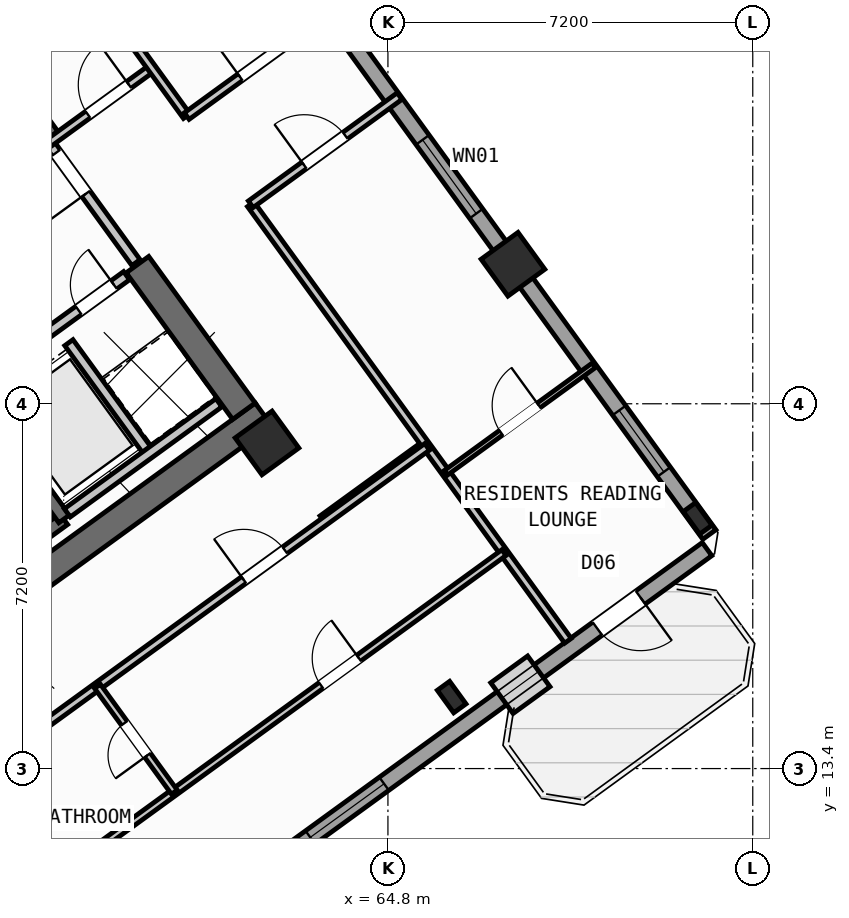
"""IFC4 building model, lengths in metres.
Left out: names, types, materials, properties, quantities, classifications, styles, units other than length and angle.
Written with IfcOpenShell. Run it as: python <this file> out.ifc"""

import sys

from ifc_helpers import new_model, si_unit, direction, frame, frame_2d, origin, origin_2d, place, context, subcontext, project, spatial, rectangle, hollow_rectangle, i_section, extrude, source, transform, mapped, element, fill, save


model = new_model("IFC4")
c1 = context("Model", 3, precision=1e-05, world=origin(), true_north=direction((0.0, 1.0)))
c2 = subcontext(c1, "Body", "Model", "MODEL_VIEW")
j1 = project(units=[si_unit("LENGTHUNIT", "METRE"), si_unit("PLANEANGLEUNIT", "RADIAN")], contexts=[c1])
p1 = place(None, origin())
s1 = spatial("IfcSite", under=j1, at=p1, CompositionType="ELEMENT")
p2 = place(p1, origin())
s2 = spatial("IfcBuilding", under=s1, at=p2, CompositionType="ELEMENT")
p3 = place(p2, frame((0.0, 0.0, 147.9)))
s3 = spatial("IfcBuildingStorey", under=s2, at=p3, CompositionType="ELEMENT", Elevation=147.9)
p4 = place(p3, frame((52.359, 13.14, 0.0), z_axis=(0.0, 0.0, 1.0), x_axis=(0.809014896919, 0.587788139183, 0.0)))
e1 = element("IfcWall", 1, at=p4, inside=s3, PredefinedType="SHEAR", context=c2, shape_type="SweptSolid", body=[
    extrude(rectangle(XDim=12.34, YDim=0.55, at=frame_2d((6.17, 0.0))), origin(), (0.0, 0.0, 1.0), 3.35),
])
p5 = place(p3, frame((61.958, 20.454, 0.0), z_axis=(0.0, 0.0, 1.0), x_axis=(-0.587802113096, 0.809004744015, 0.0)))
e2 = element("IfcWall", 2, at=p5, inside=s3, PredefinedType="SHEAR", context=c2, shape_type="SweptSolid", body=[
    extrude(rectangle(XDim=3.575, YDim=0.55, at=frame_2d((1.788, 0.0))), origin(), (0.0, 0.0, 1.0), 3.35),
])
p6 = place(p3, frame((58.064, 25.813, 0.0), z_axis=(0.0, 0.0, 1.0), x_axis=(-0.587764933797, 0.809031756236, 0.0)))
e3 = element("IfcWall", 3, at=p6, inside=s3, PredefinedType="SHEAR", context=c2, shape_type="SweptSolid", body=[
    extrude(rectangle(XDim=6.425, YDim=0.55, at=frame_2d((3.212, 0.0))), origin(), (0.0, 0.0, 1.0), 3.35),
])
m1 = source(origin(), c2, "Body", "SweptSolid", [
    extrude(i_section(OverallWidth=0.3, OverallDepth=0.55, WebThickness=0.015, FlangeThickness=0.029, at=origin_2d()), origin(), (0.0, 0.0, 1.0), 3.6),
])
p7 = place(p3, frame((66.058, 14.811, 0.0), z_axis=(0.0, 0.0, 1.0), x_axis=(0.809016994375, 0.587785252292, 0.0)))
e4 = element("IfcColumn", 4, at=p7, inside=s3, PredefinedType="COLUMN", context=c2, shape_type="MappedRepresentation", body=[
    mapped(m1, transform((0.0, 0.0, 0.0), scale=1.0)),
])
m2 = source(origin(), c2, "Body", "SweptSolid", [
    extrude(hollow_rectangle(XDim=0.9, YDim=0.9, WallThickness=0.036, at=origin_2d()), origin(), (0.0, 0.0, 1.0), 3.6),
])
p8 = place(p3, frame((62.414, 19.827, 0.0), z_axis=(0.0, 0.0, 1.0), x_axis=(0.809016994375, 0.587785252292, 0.0)))
e5 = element("IfcColumn", 5, at=p8, inside=s3, PredefinedType="COLUMN", context=c2, shape_type="MappedRepresentation", body=[
    mapped(m2, transform((0.0, 0.0, 0.0), scale=1.0)),
])
p9 = place(p3, frame((70.912, 18.338, 0.0), z_axis=(0.0, 0.0, 1.0), x_axis=(0.809016994375, 0.587785252292, 0.0)))
e6 = element("IfcColumn", 6, at=p9, inside=s3, PredefinedType="COLUMN", context=c2, shape_type="MappedRepresentation", body=[
    mapped(m1, transform((0.0, 0.0, 0.0), scale=1.0)),
])
p10 = place(p3, frame((67.268, 23.354, 0.0), z_axis=(0.0, 0.0, 1.0), x_axis=(0.809016994375, 0.587785252292, 0.0)))
e7 = element("IfcColumn", 7, at=p10, inside=s3, PredefinedType="COLUMN", context=c2, shape_type="MappedRepresentation", body=[
    mapped(m2, transform((0.0, 0.0, 0.0), scale=1.0)),
])
p11 = place(p3, frame((43.938, 25.192, 0.0), z_axis=(0.0, 0.0, 1.0), x_axis=(0.809016324578, 0.587786174187, 0.0)))
e8 = element("IfcWall", 8, at=p11, inside=s3, PredefinedType="STANDARD", context=c2, shape_type="SweptSolid", body=[
    extrude(rectangle(XDim=17.587, YDim=0.32, at=frame_2d((8.794, 0.0))), origin(), (0.0, 0.0, 1.0), 3.35),
])
p12 = place(p11, frame((14.914, 0.0, 0.0)))
e9 = element("IfcOpeningElement", 9, at=p12, cuts=e8, PredefinedType="OPENING", context=c2, shape_type="SweptSolid", body=[
    extrude(rectangle(XDim=1.05, YDim=2.15, at=frame_2d((0.525, 1.075))), frame((0.0, 0.17, 0.0), z_axis=(0.0, -1.0, 0.0), x_axis=(1.0, 0.0, 0.0)), (0.0, 0.0, 1.0), 0.34),
])
p13 = place(p11, frame((2.144, 0.0, 0.8)))
e10 = element("IfcOpeningElement", 10, at=p13, cuts=e8, PredefinedType="OPENING", context=c2, shape_type="SweptSolid", body=[
    extrude(rectangle(XDim=2.1, YDim=1.55, at=frame_2d((1.05, 0.775))), frame((0.0, 0.17, 0.0), z_axis=(0.0, -1.0, 0.0), x_axis=(1.0, 0.0, 0.0)), (0.0, 0.0, 1.0), 0.34),
])
p14 = place(p11, frame((7.344, 0.0, 0.8)))
e11 = element("IfcOpeningElement", 11, at=p14, cuts=e8, PredefinedType="OPENING", context=c2, shape_type="SweptSolid", body=[
    extrude(rectangle(XDim=2.1, YDim=1.55, at=frame_2d((1.05, 0.775))), frame((0.0, 0.17, 0.0), z_axis=(0.0, -1.0, 0.0), x_axis=(1.0, 0.0, 0.0)), (0.0, 0.0, 1.0), 0.34),
])
p15 = place(p3, frame((58.455, 35.484, 0.0), z_axis=(0.0, 0.0, 1.0), x_axis=(0.587783625747, -0.809018176127, 0.0)))
e12 = element("IfcWall", 12, at=p15, inside=s3, PredefinedType="STANDARD", context=c2, shape_type="SweptSolid", body=[
    extrude(rectangle(XDim=21.587, YDim=0.32, at=frame_2d((10.794, 0.0))), origin(), (0.0, 0.0, 1.0), 2.775),
])
p16 = place(p15, frame((2.994, 0.0, 0.8)))
e13 = element("IfcOpeningElement", 13, at=p16, cuts=e12, PredefinedType="OPENING", context=c2, shape_type="SweptSolid", body=[
    extrude(rectangle(XDim=2.1, YDim=1.55, at=frame_2d((1.05, 0.775))), frame((0.0, 0.17, 0.0), z_axis=(0.0, -1.0, 0.0), x_axis=(1.0, 0.0, 0.0)), (0.0, 0.0, 1.0), 0.34),
])
p17 = place(p15, frame((11.959, 0.0, 0.85)))
e14 = element("IfcOpeningElement", 14, at=p17, cuts=e12, PredefinedType="OPENING", context=c2, shape_type="SweptSolid", body=[
    extrude(rectangle(XDim=1.8, YDim=1.5, at=frame_2d((0.9, 0.75))), frame((0.0, 0.17, 0.0), z_axis=(0.0, -1.0, 0.0), x_axis=(1.0, 0.0, 0.0)), (0.0, 0.0, 1.0), 0.34),
])
p18 = place(p15, frame((18.56, 0.0, 0.85)))
e15 = element("IfcOpeningElement", 15, at=p18, cuts=e12, PredefinedType="OPENING", context=c2, shape_type="SweptSolid", body=[
    extrude(rectangle(XDim=1.5, YDim=1.5, at=frame_2d((0.75, 0.75))), frame((0.0, 0.17, 0.0), z_axis=(0.0, -1.0, 0.0), x_axis=(1.0, 0.0, 0.0)), (0.0, 0.0, 1.0), 0.34),
])
p19 = place(p3, frame((71.098, 17.731, 0.0), z_axis=(0.0, 0.0, 1.0), x_axis=(-0.809021120468, -0.587779573171, 0.0)))
e16 = element("IfcWall", 16, at=p19, inside=s3, PredefinedType="STANDARD", context=c2, shape_type="SweptSolid", body=[
    extrude(rectangle(XDim=17.588, YDim=0.32, at=frame_2d((8.794, 0.0))), origin(), (0.0, 0.0, 1.0), 3.35),
])
p20 = place(p19, frame((1.624, 0.0, 0.0)))
e17 = element("IfcOpeningElement", 17, at=p20, cuts=e16, PredefinedType="OPENING", context=c2, shape_type="SweptSolid", body=[
    extrude(rectangle(XDim=1.05, YDim=2.15, at=frame_2d((0.525, 1.075))), frame((0.0, 0.17, 0.0), z_axis=(0.0, -1.0, 0.0), x_axis=(1.0, 0.0, 0.0)), (0.0, 0.0, 1.0), 0.34),
])
p21 = place(p19, frame((4.104, 0.0, 1.0)))
e18 = element("IfcOpeningElement", 18, at=p21, cuts=e16, PredefinedType="OPENING", context=c2, shape_type="SweptSolid", body=[
    extrude(rectangle(XDim=0.9, YDim=1.25, at=frame_2d((0.45, 0.625))), frame((0.0, 0.17, 0.0), z_axis=(0.0, -1.0, 0.0), x_axis=(1.0, 0.0, 0.0)), (0.0, 0.0, 1.0), 0.34),
])
p22 = place(p19, frame((7.879, 0.0, 0.85)))
e19 = element("IfcOpeningElement", 19, at=p22, cuts=e16, PredefinedType="OPENING", context=c2, shape_type="SweptSolid", body=[
    extrude(rectangle(XDim=1.8, YDim=1.5, at=frame_2d((0.9, 0.75))), frame((0.0, 0.17, 0.0), z_axis=(0.0, -1.0, 0.0), x_axis=(1.0, 0.0, 0.0)), (0.0, 0.0, 1.0), 0.34),
])
p23 = place(p19, frame((12.849, 0.0, 0.85)))
e20 = element("IfcOpeningElement", 20, at=p23, cuts=e16, PredefinedType="OPENING", context=c2, shape_type="SweptSolid", body=[
    extrude(rectangle(XDim=1.8, YDim=1.5, at=frame_2d((0.9, 0.75))), frame((0.0, 0.17, 0.0), z_axis=(0.0, -1.0, 0.0), x_axis=(1.0, 0.0, 0.0)), (0.0, 0.0, 1.0), 0.34),
])
p24 = place(p3, frame((52.472, 14.013, 0.0), z_axis=(0.0, 0.0, 1.0), x_axis=(0.809028366311, 0.587769599847, 0.0)))
e21 = element("IfcWall", 21, at=p24, inside=s3, PredefinedType="SHEAR", context=c2, shape_type="SweptSolid", body=[
    extrude(rectangle(XDim=7.33, YDim=0.26, at=frame_2d((3.665, 0.0))), origin(), (0.0, 0.0, 1.0), 3.35),
])
p25 = place(p3, frame((58.41, 18.327, 0.0), z_axis=(0.0, 0.0, 1.0), x_axis=(-0.58776738483, 0.809029975545, 0.0)))
e22 = element("IfcWall", 22, at=p25, inside=s3, PredefinedType="SHEAR", context=c2, shape_type="SweptSolid", body=[
    extrude(rectangle(XDim=3.16, YDim=0.26, at=frame_2d((1.58, 0.0))), origin(), (0.0, 0.0, 1.0), 3.35),
])
p26 = place(p3, frame((56.553, 20.884, 0.0), z_axis=(0.0, 0.0, 1.0), x_axis=(0.809023564264, 0.58777620951, 0.0)))
e23 = element("IfcWall", 23, at=p26, inside=s3, PredefinedType="STANDARD", context=c2, shape_type="SweptSolid", body=[
    extrude(rectangle(XDim=3.818, YDim=0.2, at=frame_2d((1.909, 0.0))), origin(), (0.0, 0.0, 1.0), 3.34),
])
p27 = place(p26, frame((0.57, 0.0, 0.0)))
e24 = element("IfcOpeningElement", 24, at=p27, cuts=e23, PredefinedType="OPENING", context=c2, shape_type="SweptSolid", body=[
    extrude(rectangle(XDim=1.1, YDim=2.15, at=frame_2d((0.55, 1.075))), frame((0.0, 0.11, 0.0), z_axis=(0.0, -1.0, 0.0), x_axis=(1.0, 0.0, 0.0)), (0.0, 0.0, 1.0), 0.22),
])
p28 = place(p26, frame((2.65, 0.0, 0.0)))
e25 = element("IfcOpeningElement", 25, at=p28, cuts=e23, PredefinedType="OPENING", context=c2, shape_type="SweptSolid", body=[
    extrude(rectangle(XDim=0.86, YDim=2.05, at=frame_2d((0.43, 1.025))), frame((0.0, 0.11, 0.0), z_axis=(0.0, -1.0, 0.0), x_axis=(1.0, 0.0, 0.0)), (0.0, 0.0, 1.0), 0.22),
])
p29 = place(p3, frame((60.067, 19.655, 0.0), z_axis=(0.0, 0.0, 1.0), x_axis=(-0.587800520745, 0.809005900975, 0.0)))
e26 = element("IfcWall", 26, at=p29, inside=s3, PredefinedType="STANDARD", context=c2, shape_type="SweptSolid", body=[
    extrude(rectangle(XDim=2.66, YDim=0.2, at=frame_2d((1.33, 0.0))), origin(), (0.0, 0.0, 1.0), 3.34),
])
p30 = place(p3, frame((58.472, 18.447, 0.0), z_axis=(0.0, 0.0, 1.0), x_axis=(0.809018631237, 0.587782999339, 0.0)))
e27 = element("IfcWall", 27, at=p30, inside=s3, PredefinedType="STANDARD", context=c2, shape_type="SweptSolid", body=[
    extrude(rectangle(XDim=3.698, YDim=0.2, at=frame_2d((1.849, 0.0))), origin(), (0.0, 0.0, 1.0), 3.34),
])
p31 = place(p3, frame((59.827, 23.386, 0.0), z_axis=(0.0, 0.0, 1.0), x_axis=(-0.587803840107, 0.809003489211, 0.0)))
e28 = element("IfcWall", 28, at=p31, inside=s3, PredefinedType="STANDARD", context=c2, shape_type="SweptSolid", body=[
    extrude(rectangle(XDim=2.96, YDim=0.2, at=frame_2d((1.48, 0.0))), origin(), (0.0, 0.0, 1.0), 3.34),
])
p32 = place(p31, frame((1.68, 0.0, 0.0)))
e29 = element("IfcOpeningElement", 29, at=p32, cuts=e28, PredefinedType="OPENING", context=c2, shape_type="SweptSolid", body=[
    extrude(rectangle(XDim=1.0, YDim=2.1, at=frame_2d((0.5, 1.05))), frame((0.0, 0.11, 0.0), z_axis=(0.0, -1.0, 0.0), x_axis=(1.0, 0.0, 0.0)), (0.0, 0.0, 1.0), 0.22),
])
p33 = place(p3, frame((63.507, 18.322, 0.0), z_axis=(0.0, 0.0, 1.0), x_axis=(0.809034604122, 0.587761013791, 0.0)))
e30 = element("IfcWall", 30, at=p33, inside=s3, PredefinedType="PARTITIONING", context=c2, shape_type="SweptSolid", body=[
    extrude(rectangle(XDim=2.51, YDim=0.16, at=frame_2d((1.255, 0.0))), origin(), (0.0, 0.0, 1.0), 3.34),
])
p34 = place(p3, frame((58.111, 25.749, 0.0), z_axis=(0.0, 0.0, 1.0), x_axis=(0.809000999347, 0.58780726693, 0.0)))
e31 = element("IfcWall", 31, at=p34, inside=s3, PredefinedType="PARTITIONING", context=c2, shape_type="SweptSolid", body=[
    extrude(rectangle(XDim=2.51, YDim=0.16, at=frame_2d((1.255, 0.0))), origin(), (0.0, 0.0, 1.0), 2.775),
])
p35 = place(p34, frame((0.95, 0.0, 0.0)))
e32 = element("IfcOpeningElement", 32, at=p35, cuts=e31, PredefinedType="OPENING", context=c2, shape_type="SweptSolid", body=[
    extrude(rectangle(XDim=1.0, YDim=2.1, at=frame_2d((0.5, 1.05))), frame((0.0, 0.09, 0.0), z_axis=(0.0, -1.0, 0.0), x_axis=(1.0, 0.0, 0.0)), (0.0, 0.0, 1.0), 0.18),
])
p36 = place(p3, frame((68.353, 15.922, 0.0), z_axis=(0.0, 0.0, 1.0), x_axis=(-0.587783168305, 0.809018508476, 0.0)))
e33 = element("IfcWall", 33, at=p36, inside=s3, PredefinedType="PARTITIONING", context=c2, shape_type="SweptSolid", body=[
    extrude(rectangle(XDim=10.65, YDim=0.16, at=frame_2d((5.325, 0.0))), origin(), (0.0, 0.0, 1.0), 3.34),
])
p37 = place(p3, frame((60.829, 26.278, 0.0), z_axis=(0.0, 0.0, 1.0), x_axis=(-0.587781800813, 0.80901950201, 0.0)))
e34 = element("IfcWall", 34, at=p37, inside=s3, PredefinedType="PARTITIONING", context=c2, shape_type="SweptSolid", body=[
    extrude(rectangle(XDim=8.9, YDim=0.16, at=frame_2d((4.45, 0.0))), origin(), (0.0, 0.0, 1.0), 3.34),
])
p38 = place(p3, frame((62.093, 24.538, 0.0), z_axis=(0.0, 0.0, 1.0), x_axis=(0.809035546126, 0.58775971715, 0.0)))
e35 = element("IfcWall", 35, at=p38, inside=s3, PredefinedType="PARTITIONING", context=c2, shape_type="SweptSolid", body=[
    extrude(rectangle(XDim=3.63, YDim=0.16, at=frame_2d((1.815, 0.0))), origin(), (0.0, 0.0, 1.0), 3.34),
])
p39 = place(p38, frame((1.305, 0.0, 0.0)))
e36 = element("IfcOpeningElement", 36, at=p39, cuts=e35, PredefinedType="OPENING", context=c2, shape_type="SweptSolid", body=[
    extrude(rectangle(XDim=1.0, YDim=2.1, at=frame_2d((0.5, 1.05))), frame((0.0, 0.09, 0.0), z_axis=(0.0, -1.0, 0.0), x_axis=(1.0, 0.0, 0.0)), (0.0, 0.0, 1.0), 0.18),
])
p40 = place(p3, frame((60.829, 26.278, 0.0), z_axis=(0.0, 0.0, 1.0), x_axis=(0.809003564202, 0.587803736896, 0.0)))
e37 = element("IfcWall", 37, at=p40, inside=s3, PredefinedType="PARTITIONING", context=c2, shape_type="SweptSolid", body=[
    extrude(rectangle(XDim=3.63, YDim=0.16, at=frame_2d((1.815, 0.0))), origin(), (0.0, 0.0, 1.0), 3.34),
])
p41 = place(p40, frame((1.305, 0.0, 0.0)))
e38 = element("IfcOpeningElement", 38, at=p41, cuts=e37, PredefinedType="OPENING", context=c2, shape_type="SweptSolid", body=[
    extrude(rectangle(XDim=1.0, YDim=2.1, at=frame_2d((0.5, 1.05))), frame((0.0, 0.09, 0.0), z_axis=(0.0, -1.0, 0.0), x_axis=(1.0, 0.0, 0.0)), (0.0, 0.0, 1.0), 0.18),
])
p42 = place(p3, frame((65.944, 19.238, 0.0), z_axis=(0.0, 0.0, 1.0), x_axis=(0.809013833588, 0.587789602718, 0.0)))
e39 = element("IfcWall", 39, at=p42, inside=s3, PredefinedType="PARTITIONING", context=c2, shape_type="SweptSolid", body=[
    extrude(rectangle(XDim=3.61, YDim=0.11, at=frame_2d((1.805, 0.0))), origin(), (0.0, 0.0, 1.0), 3.34),
])
p43 = place(p42, frame((1.345, 0.0, 0.0)))
e40 = element("IfcOpeningElement", 40, at=p43, cuts=e39, PredefinedType="OPENING", context=c2, shape_type="SweptSolid", body=[
    extrude(rectangle(XDim=0.92, YDim=2.08, at=frame_2d((0.46, 1.04))), frame((0.0, 0.065, 0.0), z_axis=(0.0, -1.0, 0.0), x_axis=(1.0, 0.0, 0.0)), (0.0, 0.0, 1.0), 0.13),
])
p44 = place(p3, frame((53.705, 11.126, 0.0), z_axis=(0.0, 0.0, 1.0), x_axis=(0.809014504436, 0.587788679384, 0.0)))
e41 = element("IfcWall", 41, at=p44, inside=s3, PredefinedType="PARTITIONING", context=c2, shape_type="SweptSolid", body=[
    extrude(rectangle(XDim=14.67, YDim=0.16, at=frame_2d((7.335, 0.0))), origin(), (0.0, 0.0, 1.0), 3.34),
])
p45 = place(p44, frame((10.2, 0.0, 0.0)))
e42 = element("IfcOpeningElement", 42, at=p45, cuts=e41, PredefinedType="OPENING", context=c2, shape_type="SweptSolid", body=[
    extrude(rectangle(XDim=1.0, YDim=2.1, at=frame_2d((0.5, 1.05))), frame((0.0, 0.09, 0.0), z_axis=(0.0, -1.0, 0.0), x_axis=(1.0, 0.0, 0.0)), (0.0, 0.0, 1.0), 0.18),
])
p46 = place(p3, frame((56.249, 9.785, 0.0), z_axis=(0.0, 0.0, 1.0), x_axis=(0.809011747655, 0.587792473715, 0.0)))
e43 = element("IfcWall", 43, at=p46, inside=s3, PredefinedType="PLUMBINGWALL", context=c2, shape_type="SweptSolid", body=[
    extrude(rectangle(XDim=13.4, YDim=0.14, at=frame_2d((6.7, 0.0))), origin(), (0.0, 0.0, 1.0), 3.34),
])
p47 = place(p46, frame((8.94, 0.0, 0.0)))
e44 = element("IfcOpeningElement", 44, at=p47, cuts=e43, PredefinedType="OPENING", context=c2, shape_type="SweptSolid", body=[
    extrude(rectangle(XDim=0.92, YDim=2.08, at=frame_2d((0.46, 1.04))), frame((0.0, 0.08, 0.0), z_axis=(0.0, -1.0, 0.0), x_axis=(1.0, 0.0, 0.0)), (0.0, 0.0, 1.0), 0.16),
])
p48 = place(p3, frame((60.585, 12.936, 0.0), z_axis=(0.0, 0.0, 1.0), x_axis=(-0.587772116736, 0.809026537752, 0.0)))
e45 = element("IfcWall", 45, at=p48, inside=s3, PredefinedType="PLUMBINGWALL", context=c2, shape_type="SweptSolid", body=[
    extrude(rectangle(XDim=2.58, YDim=0.14, at=frame_2d((1.29, 0.0))), origin(), (0.0, 0.0, 1.0), 3.34),
])
p49 = place(p48, frame((0.9, 0.0, 0.0)))
e46 = element("IfcOpeningElement", 46, at=p49, cuts=e45, PredefinedType="OPENING", context=c2, shape_type="SweptSolid", body=[
    extrude(rectangle(XDim=0.78, YDim=2.05, at=frame_2d((0.39, 1.025))), frame((0.0, 0.08, 0.0), z_axis=(0.0, -1.0, 0.0), x_axis=(1.0, 0.0, 0.0)), (0.0, 0.0, 1.0), 0.16),
])
m3 = source(origin(), c2, "Body", "SweptSolid", [
    extrude(rectangle(XDim=1.05, YDim=2.15, at=frame_2d((0.525, 1.075))), frame((0.0, 0.025, 0.0), z_axis=(0.0, -1.0, 0.0), x_axis=(1.0, 0.0, 0.0)), (0.0, 0.0, 1.0), 0.05),
])
p50 = place(p20, origin())
e47 = element("IfcDoor", 47, at=p50, inside=s3, OperationType="SINGLE_SWING_LEFT", PredefinedType="DOOR", context=c2, shape_type="MappedRepresentation", body=[
    mapped(m3, transform((0.0, 0.0, 0.0), scale=1.0)),
])
fill(e17, e47)
m4 = source(origin(), c2, "Body", "SweptSolid", [
    extrude(rectangle(XDim=1.8, YDim=1.5, at=frame_2d((0.9, 0.75))), frame((0.0, 0.03, 0.0), z_axis=(0.0, -1.0, 0.0), x_axis=(1.0, 0.0, 0.0)), (0.0, 0.0, 1.0), 0.06),
])
p51 = place(p17, origin())
e48 = element("IfcWindow", 48, at=p51, inside=s3, PartitioningType="SINGLE_PANEL", PredefinedType="WINDOW", context=c2, shape_type="MappedRepresentation", body=[
    mapped(m4, transform((0.0, 0.0, 0.0), scale=1.0)),
])
fill(e14, e48)
m5 = source(origin(), c2, "Body", "SweptSolid", [
    extrude(rectangle(XDim=1.5, YDim=1.5, at=frame_2d((0.75, 0.75))), frame((0.0, 0.03, 0.0), z_axis=(0.0, -1.0, 0.0), x_axis=(1.0, 0.0, 0.0)), (0.0, 0.0, 1.0), 0.06),
])
p52 = place(p18, origin())
e49 = element("IfcWindow", 49, at=p52, inside=s3, PartitioningType="SINGLE_PANEL", PredefinedType="WINDOW", context=c2, shape_type="MappedRepresentation", body=[
    mapped(m5, transform((0.0, 0.0, 0.0), scale=1.0)),
])
fill(e15, e49)
m6 = source(origin(), c2, "Body", "SweptSolid", [
    extrude(rectangle(XDim=0.9, YDim=1.25, at=frame_2d((0.45, 0.625))), frame((0.0, 0.03, 0.0), z_axis=(0.0, -1.0, 0.0), x_axis=(1.0, 0.0, 0.0)), (0.0, 0.0, 1.0), 0.06),
])
p53 = place(p21, origin())
e50 = element("IfcWindow", 50, at=p53, inside=s3, PartitioningType="SINGLE_PANEL", PredefinedType="WINDOW", context=c2, shape_type="MappedRepresentation", body=[
    mapped(m6, transform((0.0, 0.0, 0.0), scale=1.0)),
])
fill(e18, e50)
p54 = place(p22, origin())
e51 = element("IfcWindow", 51, at=p54, inside=s3, PartitioningType="SINGLE_PANEL", PredefinedType="WINDOW", context=c2, shape_type="MappedRepresentation", body=[
    mapped(m4, transform((0.0, 0.0, 0.0), scale=1.0)),
])
fill(e19, e51)
m7 = source(origin(), c2, "Body", "SweptSolid", [
    extrude(rectangle(XDim=0.86, YDim=2.05, at=frame_2d((0.43, 1.025))), frame((0.0, 0.025, 0.0), z_axis=(0.0, -1.0, 0.0), x_axis=(1.0, 0.0, 0.0)), (0.0, 0.0, 1.0), 0.05),
])
p55 = place(p28, origin())
e52 = element("IfcDoor", 52, at=p55, inside=s3, OperationType="SINGLE_SWING_RIGHT", PredefinedType="DOOR", context=c2, shape_type="MappedRepresentation", body=[
    mapped(m7, transform((0.0, 0.0, 0.0), scale=1.0)),
])
fill(e25, e52)
m8 = source(origin(), c2, "Body", "SweptSolid", [
    extrude(rectangle(XDim=1.0, YDim=2.1, at=frame_2d((0.5, 1.05))), frame((0.0, 0.025, 0.0), z_axis=(0.0, -1.0, 0.0), x_axis=(1.0, 0.0, 0.0)), (0.0, 0.0, 1.0), 0.05),
])
p56 = place(p35, origin())
e53 = element("IfcDoor", 53, at=p56, inside=s3, OperationType="SINGLE_SWING_RIGHT", PredefinedType="DOOR", context=c2, shape_type="MappedRepresentation", body=[
    mapped(m8, transform((0.0, 0.0, 0.0), scale=1.0)),
])
fill(e32, e53)
p57 = place(p32, origin())
e54 = element("IfcDoor", 54, at=p57, inside=s3, OperationType="SINGLE_SWING_LEFT", PredefinedType="DOOR", context=c2, shape_type="MappedRepresentation", body=[
    mapped(m8, transform((0.0, 0.0, 0.0), scale=1.0)),
])
fill(e29, e54)
p58 = place(p41, origin())
e55 = element("IfcDoor", 55, at=p58, inside=s3, OperationType="SINGLE_SWING_LEFT", PredefinedType="DOOR", context=c2, shape_type="MappedRepresentation", body=[
    mapped(m8, transform((0.0, 0.0, 0.0), scale=1.0)),
])
fill(e38, e55)
p59 = place(p39, origin())
e56 = element("IfcDoor", 56, at=p59, inside=s3, OperationType="SINGLE_SWING_LEFT", PredefinedType="DOOR", context=c2, shape_type="MappedRepresentation", body=[
    mapped(m8, transform((0.0, 0.0, 0.0), scale=1.0)),
])
fill(e36, e56)
m9 = source(origin(), c2, "Body", "SweptSolid", [
    extrude(rectangle(XDim=0.92, YDim=2.08, at=frame_2d((0.46, 1.04))), frame((0.0, 0.025, 0.0), z_axis=(0.0, -1.0, 0.0), x_axis=(1.0, 0.0, 0.0)), (0.0, 0.0, 1.0), 0.05),
])
p60 = place(p43, origin())
e57 = element("IfcDoor", 57, at=p60, inside=s3, OperationType="SINGLE_SWING_RIGHT", PredefinedType="DOOR", context=c2, shape_type="MappedRepresentation", body=[
    mapped(m9, transform((0.0, 0.0, 0.0), scale=1.0)),
])
fill(e40, e57)
p61 = place(p45, origin())
e58 = element("IfcDoor", 58, at=p61, inside=s3, OperationType="SINGLE_SWING_LEFT", PredefinedType="DOOR", context=c2, shape_type="MappedRepresentation", body=[
    mapped(m8, transform((0.0, 0.0, 0.0), scale=1.0)),
])
fill(e42, e58)
p62 = place(p47, origin())
e59 = element("IfcDoor", 59, at=p62, inside=s3, OperationType="SINGLE_SWING_RIGHT", PredefinedType="DOOR", context=c2, shape_type="MappedRepresentation", body=[
    mapped(m9, transform((0.0, 0.0, 0.0), scale=1.0)),
])
fill(e44, e59)
m10 = source(origin(), c2, "Body", "SweptSolid", [
    extrude(rectangle(XDim=0.78, YDim=2.05, at=frame_2d((0.39, 1.025))), frame((0.0, 0.025, 0.0), z_axis=(0.0, -1.0, 0.0), x_axis=(1.0, 0.0, 0.0)), (0.0, 0.0, 1.0), 0.05),
])
p63 = place(p49, origin())
e60 = element("IfcDoor", 60, at=p63, inside=s3, OperationType="SINGLE_SWING_LEFT", PredefinedType="DOOR", context=c2, shape_type="MappedRepresentation", body=[
    mapped(m10, transform((0.0, 0.0, 0.0), scale=1.0)),
])
fill(e46, e60)
save(model, sys.argv[1])
